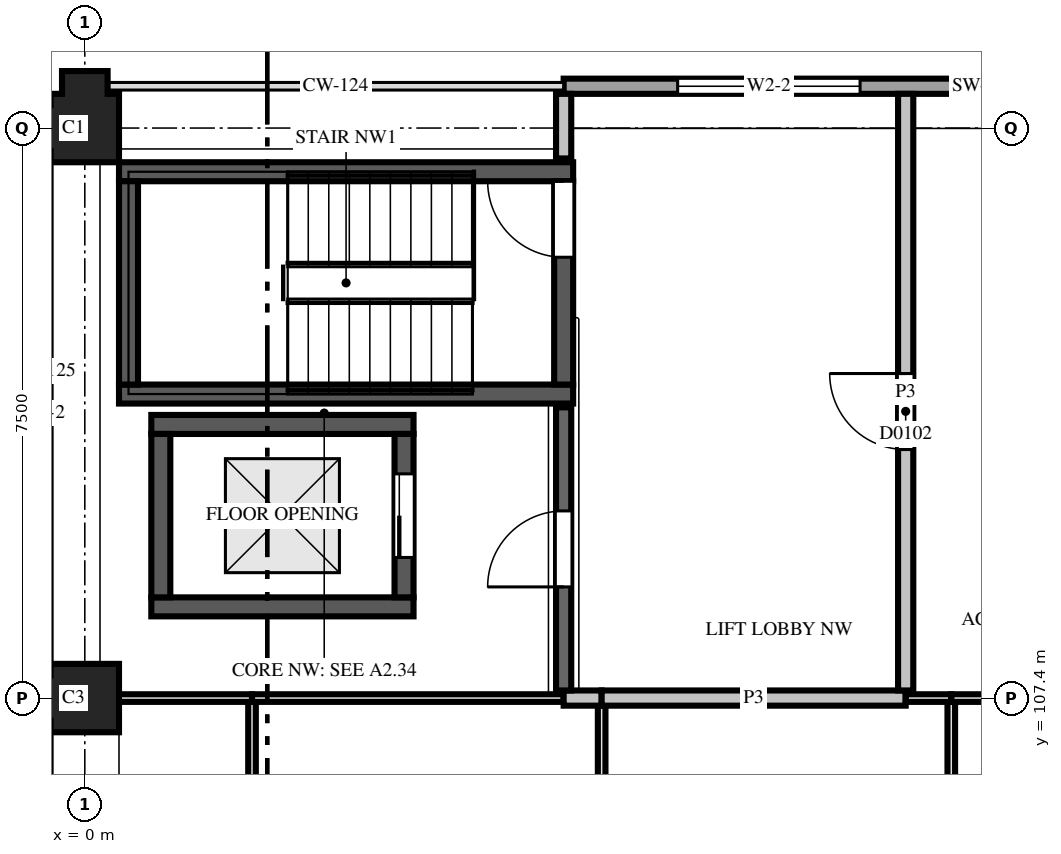
"""IFC4 building model, lengths in metres.
Left out: names, types, materials, properties, quantities, classifications, styles, units other than length and angle.
Written with IfcOpenShell. Run it as: python <this file> out.ifc"""

import sys

from ifc_helpers import new_model, si_unit, direction, frame, frame_2d, origin, place, context, subcontext, project, spatial, polyline, rectangle, outline, extrude, element, fill, save


model = new_model("IFC4")
c1 = context("Model", 3, precision=1e-05, world=origin(), true_north=direction((0.0, 1.0)))
c2 = subcontext(c1, "Body", "Model", "MODEL_VIEW")
j1 = project(units=[si_unit("LENGTHUNIT", "METRE"), si_unit("PLANEANGLEUNIT", "RADIAN")], contexts=[c1])
p1 = place(None, origin())
s1 = spatial("IfcSite", under=j1, at=p1, CompositionType="ELEMENT")
p2 = place(p1, origin())
s2 = spatial("IfcBuilding", under=s1, at=p2, CompositionType="ELEMENT")
p3 = place(p2, frame((0.0, 0.0, 4.5)))
s3 = spatial("IfcBuildingStorey", under=s2, at=p3, CompositionType="ELEMENT", Elevation=4.5)
p4 = place(p3, frame((0.0, 107.4, 0.0), z_axis=(0.0, 0.0, 1.0), x_axis=(-1.0, 0.0, 0.0)))
e1 = element("IfcColumn", 1, at=p4, inside=s3, PredefinedType="COLUMN", context=c2, shape_type="SweptSolid", body=[
    extrude(outline(polyline([(-0.45, -0.45), (0.45, -0.45), (0.45, -0.3), (0.75, -0.3), (0.75, 0.3), (0.45, 0.3), (0.45, 0.45), (-0.45, 0.45), (-0.45, -0.45)])), origin(), (0.0, 0.0, 1.0), 3.7),
])
p5 = place(p3, frame((0.0, 114.9, 0.0), z_axis=(0.0, 0.0, 1.0), x_axis=(0.0, 1.0, 0.0)))
e2 = element("IfcColumn", 2, at=p5, inside=s3, PredefinedType="COLUMN", context=c2, shape_type="SweptSolid", body=[
    extrude(outline(polyline([(-0.45, -0.45), (0.45, -0.45), (0.45, -0.3), (0.75, -0.3), (0.75, 0.3), (0.45, 0.3), (0.45, 0.45), (0.3, 0.45), (0.3, 0.75), (-0.3, 0.75), (-0.3, 0.45), (-0.45, 0.45), (-0.45, -0.45)])), origin(), (0.0, 0.0, 1.0), 3.7),
])
for number, where, z_axis, x_axis in (
    (3, (0.875, 108.6, 0.0), (0.0, 0.0, 1.0), (1.0, 0.0, 0.0)),
    (4, (0.875, 111.0, 0.0), (0.0, 0.0, 1.0), (1.0, 0.0, 0.0)),
):
    element("IfcWall", number, at=place(p3, frame(where, z_axis=z_axis, x_axis=x_axis)), inside=s3, PredefinedType="SHEAR", context=c2, shape_type="SweptSolid", body=[
        extrude(rectangle(XDim=3.45, YDim=0.25, at=frame_2d((1.725, 0.0))), origin(), (0.0, 0.0, 1.0), 3.7),
    ])
for number, where, z_axis, x_axis in (
    (5, (0.45, 111.4, 0.0), (0.0, 0.0, 1.0), (1.0, 0.0, 0.0)),
    (6, (0.45, 114.325, 0.0), (0.0, 0.0, 1.0), (1.0, 0.0, 0.0)),
):
    element("IfcWall", number, at=place(p3, frame(where, z_axis=z_axis, x_axis=x_axis)), inside=s3, PredefinedType="SHEAR", context=c2, shape_type="SweptSolid", body=[
        extrude(rectangle(XDim=5.975, YDim=0.25, at=frame_2d((2.988, 0.0))), origin(), (0.0, 0.0, 1.0), 3.7),
    ])
p6 = place(p3, frame((0.575, 111.525, 0.0), z_axis=(0.0, 0.0, 1.0), x_axis=(0.0, 1.0, 0.0)))
e7 = element("IfcWall", 7, at=p6, inside=s3, PredefinedType="SHEAR", context=c2, shape_type="SweptSolid", body=[
    extrude(rectangle(XDim=2.675, YDim=0.25, at=frame_2d((1.337, 0.0))), origin(), (0.0, 0.0, 1.0), 3.7),
])
p7 = place(p3, frame((1.0, 108.725, 0.0), z_axis=(0.0, 0.0, 1.0), x_axis=(0.0, 1.0, 0.0)))
e8 = element("IfcWall", 8, at=p7, inside=s3, PredefinedType="SHEAR", context=c2, shape_type="SweptSolid", body=[
    extrude(rectangle(XDim=2.15, YDim=0.25, at=frame_2d((1.075, 0.0))), origin(), (0.0, 0.0, 1.0), 3.7),
])
p8 = place(p3, frame((4.2, 108.725, 0.0), z_axis=(0.0, 0.0, 1.0), x_axis=(0.0, 1.0, 0.0)))
e9 = element("IfcWall", 9, at=p8, inside=s3, PredefinedType="SHEAR", context=c2, shape_type="SweptSolid", body=[
    extrude(rectangle(XDim=2.15, YDim=0.25, at=frame_2d((1.075, 0.0))), origin(), (0.0, 0.0, 1.0), 3.7),
])
p9 = place(p8, frame((0.525, 0.0, 0.0)))
e10 = element("IfcOpeningElement", 10, at=p9, cuts=e9, PredefinedType="OPENING", context=c2, shape_type="SweptSolid", body=[
    extrude(rectangle(XDim=1.1, YDim=2.1, at=frame_2d((0.55, 1.05))), frame((0.0, 0.135, 0.0), z_axis=(0.0, -1.0, 0.0), x_axis=(1.0, 0.0, 0.0)), (0.0, 0.0, 1.0), 0.27),
])
p10 = place(p3, frame((6.3, 111.525, 0.0), z_axis=(0.0, 0.0, 1.0), x_axis=(0.0, 1.0, 0.0)))
e11 = element("IfcWall", 11, at=p10, inside=s3, PredefinedType="SHEAR", context=c2, shape_type="SweptSolid", body=[
    extrude(rectangle(XDim=2.675, YDim=0.25, at=frame_2d((1.337, 0.0))), origin(), (0.0, 0.0, 1.0), 3.7),
])
p11 = place(p10, frame((1.675, 0.0, 0.0)))
e12 = element("IfcOpeningElement", 12, at=p11, cuts=e11, PredefinedType="OPENING", context=c2, shape_type="SweptSolid", body=[
    extrude(rectangle(XDim=1.0, YDim=2.1, at=frame_2d((0.5, 1.05))), frame((0.0, 0.135, 0.0), z_axis=(0.0, -1.0, 0.0), x_axis=(1.0, 0.0, 0.0)), (0.0, 0.0, 1.0), 0.27),
])
p12 = place(p3, frame((17.1, 115.45, 0.0), z_axis=(0.0, 0.0, 1.0), x_axis=(-1.0, 0.0, 0.0)))
e13 = element("IfcWall", 13, at=p12, inside=s3, PredefinedType="SOLIDWALL", context=c2, shape_type="SweptSolid", body=[
    extrude(rectangle(XDim=10.8, YDim=0.2, at=frame_2d((5.4, 0.0))), origin(), (0.0, 0.0, 1.0), 1.7),
])
p13 = place(p12, frame((1.5, 0.0, 0.55)))
e14 = element("IfcOpeningElement", 14, at=p13, cuts=e13, PredefinedType="OPENING", context=c2, shape_type="SweptSolid", body=[
    extrude(rectangle(XDim=2.4, YDim=1.0, at=frame_2d((1.2, 0.5))), frame((0.0, 0.11, 0.0), z_axis=(0.0, -1.0, 0.0), x_axis=(1.0, 0.0, 0.0)), (0.0, 0.0, 1.0), 0.22),
])
p14 = place(p12, frame((6.9, 0.0, 0.55)))
e15 = element("IfcOpeningElement", 15, at=p14, cuts=e13, PredefinedType="OPENING", context=c2, shape_type="SweptSolid", body=[
    extrude(rectangle(XDim=2.4, YDim=1.0, at=frame_2d((1.2, 0.5))), frame((0.0, 0.11, 0.0), z_axis=(0.0, -1.0, 0.0), x_axis=(1.0, 0.0, 0.0)), (0.0, 0.0, 1.0), 0.22),
])
p15 = place(p3, frame((2.2, 102.375, 0.0), z_axis=(0.0, 0.0, 1.0), x_axis=(0.0, 1.0, 0.0)))
e16 = element("IfcWall", 16, at=p15, inside=s3, PredefinedType="PARTITIONING", context=c2, shape_type="SweptSolid", body=[
    extrude(rectangle(XDim=4.975, YDim=0.1, at=frame_2d((2.488, 0.0))), origin(), (0.0, 0.0, 1.0), 2.88),
])
p16 = place(p3, frame((6.8, 102.35, 0.0), z_axis=(0.0, 0.0, 1.0), x_axis=(0.0, 1.0, 0.0)))
e17 = element("IfcWall", 17, at=p16, inside=s3, PredefinedType="PARTITIONING", context=c2, shape_type="SweptSolid", body=[
    extrude(rectangle(XDim=4.95, YDim=0.1, at=frame_2d((2.475, 0.0))), origin(), (0.0, 0.0, 1.0), 2.88),
])
p17 = place(p3, frame((11.4, 102.35, 0.0), z_axis=(0.0, 0.0, 1.0), x_axis=(0.0, 1.0, 0.0)))
e18 = element("IfcWall", 18, at=p17, inside=s3, PredefinedType="PARTITIONING", context=c2, shape_type="SweptSolid", body=[
    extrude(rectangle(XDim=5.0, YDim=0.1, at=frame_2d((2.5, 0.0))), origin(), (0.0, 0.0, 1.0), 2.88),
])
p18 = place(p3, frame((2.2, 107.4, 0.0), z_axis=(0.0, 0.0, 1.0), x_axis=(-1.0, 0.0, 0.0)))
e19 = element("IfcWall", 19, at=p18, inside=s3, PredefinedType="PARTITIONING", context=c2, shape_type="SweptSolid", body=[
    extrude(rectangle(XDim=2.14, YDim=0.1, at=frame_2d((1.07, 0.0))), origin(), (0.0, 0.0, 1.0), 2.88),
])
p19 = place(p3, frame((6.3, 107.4, 0.0), z_axis=(0.0, 0.0, 1.0), x_axis=(-1.0, 0.0, 0.0)))
e20 = element("IfcWall", 20, at=p19, inside=s3, PredefinedType="PARTITIONING", context=c2, shape_type="SweptSolid", body=[
    extrude(rectangle(XDim=4.1, YDim=0.1, at=frame_2d((2.05, 0.0))), origin(), (0.0, 0.0, 1.0), 2.88),
])
p20 = place(p3, frame((6.3, 107.4, 0.0), z_axis=(0.0, 0.0, 1.0), x_axis=(1.0, 0.0, 0.0)))
e21 = element("IfcWall", 21, at=p20, inside=s3, PredefinedType="PARTITIONING", context=c2, shape_type="SweptSolid", body=[
    extrude(rectangle(XDim=0.5, YDim=0.2, at=frame_2d((0.25, 0.0))), origin(), (0.0, 0.0, 1.0), 2.88),
])
p21 = place(p3, frame((6.8, 107.4, 0.0), z_axis=(0.0, 0.0, 1.0), x_axis=(1.0, 0.0, 0.0)))
e22 = element("IfcWall", 22, at=p21, inside=s3, PredefinedType="PARTITIONING", context=c2, shape_type="SweptSolid", body=[
    extrude(rectangle(XDim=4.0, YDim=0.2, at=frame_2d((2.0, 0.0))), origin(), (0.0, 0.0, 1.0), 2.88),
])
p22 = place(p3, frame((10.8, 107.5, 0.0), z_axis=(0.0, 0.0, 1.0), x_axis=(0.0, 1.0, 0.0)))
e23 = element("IfcWall", 23, at=p22, inside=s3, PredefinedType="PARTITIONING", context=c2, shape_type="SweptSolid", body=[
    extrude(rectangle(XDim=7.85, YDim=0.2, at=frame_2d((3.925, 0.0))), origin(), (0.0, 0.0, 1.0), 2.88),
])
p23 = place(p22, frame((3.17, 0.0, 0.0)))
e24 = element("IfcOpeningElement", 24, at=p23, cuts=e23, PredefinedType="OPENING", context=c2, shape_type="SweptSolid", body=[
    extrude(rectangle(XDim=1.0, YDim=2.1, at=frame_2d((0.5, 1.05))), frame((0.0, 0.11, 0.0), z_axis=(0.0, -1.0, 0.0), x_axis=(1.0, 0.0, 0.0)), (0.0, 0.0, 1.0), 0.22),
])
p24 = place(p3, frame((11.4, 107.4, 0.0), z_axis=(0.0, 0.0, 1.0), x_axis=(-1.0, 0.0, 0.0)))
e25 = element("IfcWall", 25, at=p24, inside=s3, PredefinedType="PARTITIONING", context=c2, shape_type="SweptSolid", body=[
    extrude(rectangle(XDim=0.6, YDim=0.1, at=frame_2d((0.3, 0.0))), origin(), (0.0, 0.0, 1.0), 2.88),
])
p25 = place(p3, frame((14.45, 107.4, 0.0), z_axis=(0.0, 0.0, 1.0), x_axis=(-1.0, 0.0, 0.0)))
e26 = element("IfcWall", 26, at=p25, inside=s3, PredefinedType="PARTITIONING", context=c2, shape_type="SweptSolid", body=[
    extrude(rectangle(XDim=3.05, YDim=0.1, at=frame_2d((1.525, 0.0))), origin(), (0.0, 0.0, 1.0), 2.88),
])
p26 = place(p3, frame((6.3, 111.225, 0.0), z_axis=(0.0, 0.0, 1.0), x_axis=(0.0, -1.0, 0.0)))
e27 = element("IfcWall", 27, at=p26, inside=s3, PredefinedType="PARTITIONING", context=c2, shape_type="SweptSolid", body=[
    extrude(rectangle(XDim=3.725, YDim=0.2, at=frame_2d((1.863, 0.0))), origin(), (0.0, 0.0, 1.0), 2.88),
])
p27 = place(p26, frame((1.363, 0.0, 0.0)))
e28 = element("IfcOpeningElement", 28, at=p27, cuts=e27, PredefinedType="OPENING", context=c2, shape_type="SweptSolid", body=[
    extrude(rectangle(XDim=1.0, YDim=2.1, at=frame_2d((0.5, 1.05))), frame((0.0, 0.11, 0.0), z_axis=(0.0, -1.0, 0.0), x_axis=(1.0, 0.0, 0.0)), (0.0, 0.0, 1.0), 0.22),
])
p28 = place(p3, frame((6.3, 115.35, 0.0), z_axis=(0.0, 0.0, 1.0), x_axis=(0.0, -1.0, 0.0)))
e29 = element("IfcWall", 29, at=p28, inside=s3, PredefinedType="PARTITIONING", context=c2, shape_type="SweptSolid", body=[
    extrude(rectangle(XDim=0.85, YDim=0.2, at=frame_2d((0.425, 0.0))), origin(), (0.0, 0.0, 1.0), 2.88),
])
p29 = place(p14, origin())
e30 = element("IfcWindow", 30, at=p29, inside=s3, PartitioningType="SINGLE_PANEL", PredefinedType="WINDOW", context=c2, shape_type="SweptSolid", body=[
    extrude(rectangle(XDim=2.4, YDim=1.0, at=frame_2d((1.2, 0.5))), frame((0.0, 0.03, 0.0), z_axis=(0.0, -1.0, 0.0), x_axis=(1.0, 0.0, 0.0)), (0.0, 0.0, 1.0), 0.06),
])
fill(e15, e30)
p30 = place(p23, origin())
e31 = element("IfcDoor", 31, at=p30, inside=s3, OperationType="SINGLE_SWING_LEFT", PredefinedType="DOOR", context=c2, shape_type="SweptSolid", body=[
    extrude(rectangle(XDim=1.0, YDim=2.1, at=frame_2d((0.5, 1.05))), frame((0.0, 0.025, 0.0), z_axis=(0.0, -1.0, 0.0), x_axis=(1.0, 0.0, 0.0)), (0.0, 0.0, 1.0), 0.05),
])
fill(e24, e31)
p31 = place(p9, origin())
e32 = element("IfcDoor", 32, at=p31, inside=s3, OperationType="SLIDING_TO_LEFT", PredefinedType="DOOR", context=c2, shape_type="SweptSolid", body=[
    extrude(rectangle(XDim=1.1, YDim=2.1, at=frame_2d((0.55, 1.05))), frame((0.0, 0.025, 0.0), z_axis=(0.0, -1.0, 0.0), x_axis=(1.0, 0.0, 0.0)), (0.0, 0.0, 1.0), 0.05),
])
fill(e10, e32)
p32 = place(p11, origin())
e33 = element("IfcDoor", 33, at=p32, inside=s3, OperationType="SINGLE_SWING_LEFT", PredefinedType="DOOR", context=c2, shape_type="SweptSolid", body=[
    extrude(rectangle(XDim=1.0, YDim=2.1, at=frame_2d((0.5, 1.05))), frame((0.0, 0.025, 0.0), z_axis=(0.0, -1.0, 0.0), x_axis=(1.0, 0.0, 0.0)), (0.0, 0.0, 1.0), 0.05),
])
fill(e12, e33)
p33 = place(p27, origin())
e34 = element("IfcDoor", 34, at=p33, inside=s3, OperationType="SINGLE_SWING_RIGHT", PredefinedType="DOOR", context=c2, shape_type="SweptSolid", body=[
    extrude(rectangle(XDim=1.0, YDim=2.1, at=frame_2d((0.5, 1.05))), frame((0.0, 0.025, 0.0), z_axis=(0.0, -1.0, 0.0), x_axis=(1.0, 0.0, 0.0)), (0.0, 0.0, 1.0), 0.05),
])
fill(e28, e34)
save(model, sys.argv[1])
